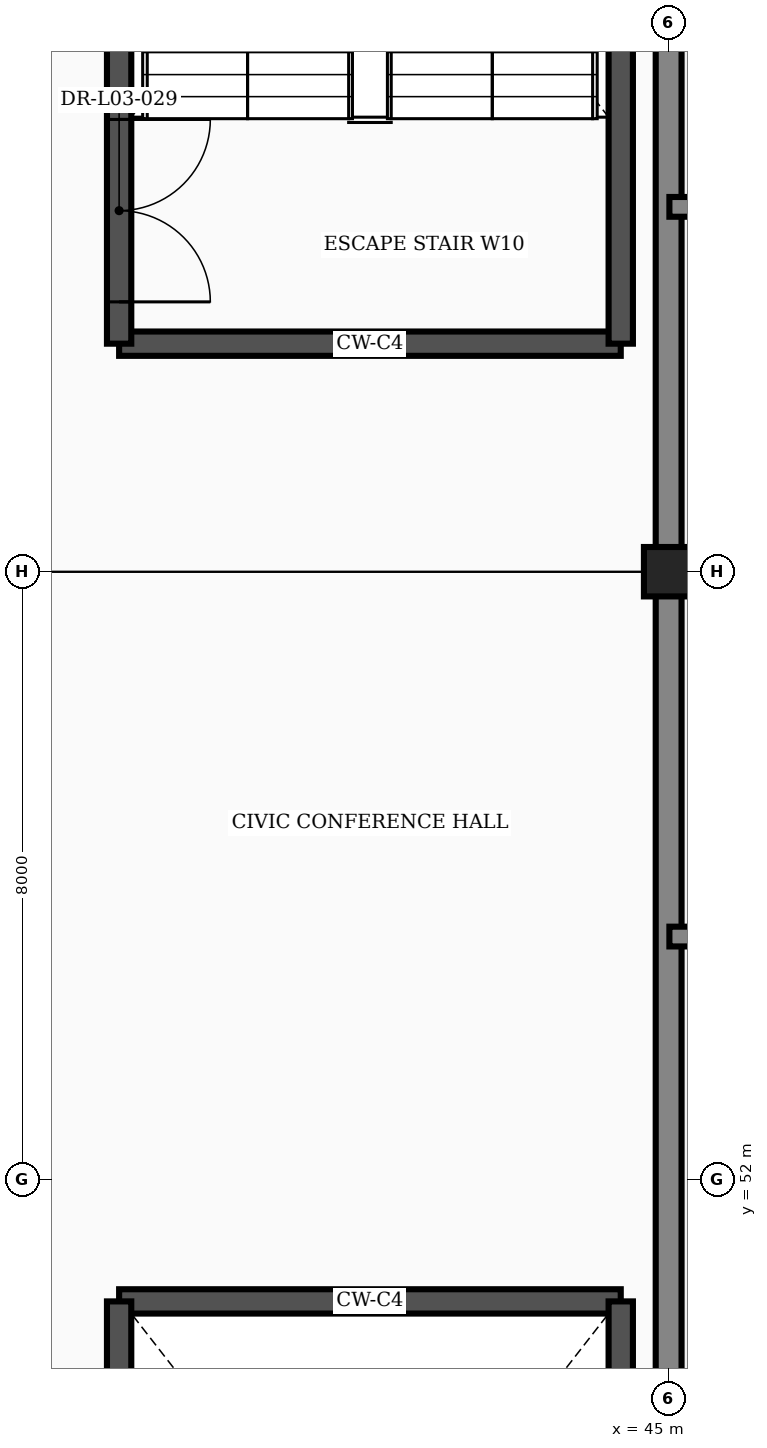
"""IFC4 building model, lengths in metres.
Left out: names, types, materials, properties, quantities, classifications, styles, units other than length and angle.
Written with IfcOpenShell. Run it as: python <this file> out.ifc"""

import sys

from ifc_helpers import new_model, si_unit, direction, frame, frame_2d, origin, origin_2d, place, context, subcontext, project, spatial, rectangle, extrude, element, fill, save


model = new_model("IFC4")
c1 = context("Model", 3, precision=1e-05, world=origin(), true_north=direction((0.0, 1.0)))
c2 = subcontext(c1, "Body", "Model", "MODEL_VIEW")
j1 = project(units=[si_unit("LENGTHUNIT", "METRE"), si_unit("PLANEANGLEUNIT", "RADIAN")], contexts=[c1])
p1 = place(None, origin())
s1 = spatial("IfcSite", under=j1, at=p1, CompositionType="ELEMENT")
p2 = place(p1, origin())
s2 = spatial("IfcBuilding", under=s1, at=p2, CompositionType="ELEMENT")
p3 = place(p2, frame((0.0, 0.0, 16.8)))
s3 = spatial("IfcBuildingStorey", under=s2, at=p3, CompositionType="ELEMENT", Elevation=16.8)
p4 = place(p3, frame((45.0, 60.0, 0.0), z_axis=(0.0, 0.0, 1.0), x_axis=(1.0, 0.0, 0.0)))
e1 = element("IfcColumn", 1, at=p4, inside=s3, PredefinedType="COLUMN", context=c2, shape_type="SweptSolid", body=[
    extrude(rectangle(XDim=0.65, YDim=0.65, at=origin_2d()), origin(), (0.0, 0.0, 1.0), 4.8),
])
for number, where, z_axis, x_axis in (
    (2, (45.0, 36.198, 0.0), (0.0, 0.0, 1.0), (0.0, 1.0, 0.0)),
    (3, (45.0, 60.317, 0.0), (0.0, 0.0, 1.0), (0.0, 1.0, 0.0)),
):
    element("IfcWall", number, at=place(p3, frame(where, z_axis=z_axis, x_axis=x_axis)), inside=s3, PredefinedType="STANDARD", context=c2, shape_type="SweptSolid", body=[
        extrude(rectangle(XDim=23.485, YDim=0.34, at=frame_2d((11.742, 0.0))), origin(), (0.0, 0.0, 1.0), 3.423),
    ])
p5 = place(p3, frame((45.01, 55.2, 4.005), z_axis=(0.0, 0.0, 1.0), x_axis=(1.0, 0.0, 0.0)))
e4 = element("IfcWall", 4, at=p5, inside=s3, PredefinedType="STANDARD", context=c2, shape_type="SweptSolid", body=[
    extrude(rectangle(XDim=17.99, YDim=0.26, at=frame_2d((8.995, 0.0))), origin(), (0.0, 0.0, 1.0), 2.049),
])
p6 = place(p5, frame((7.595, 0.0, 0.32)))
e5 = element("IfcOpeningElement", 5, at=p6, cuts=e4, PredefinedType="OPENING", context=c2, shape_type="SweptSolid", body=[
    extrude(rectangle(XDim=2.8, YDim=1.35, at=frame_2d((1.4, 0.675))), frame((0.0, 0.142, 0.0), z_axis=(0.0, -1.0, 0.0), x_axis=(1.0, 0.0, 0.0)), (0.0, 0.0, 1.0), 0.284),
])
p7 = place(p3, frame((45.01, 64.8, 4.005), z_axis=(0.0, 0.0, 1.0), x_axis=(1.0, 0.0, 0.0)))
e6 = element("IfcWall", 6, at=p7, inside=s3, PredefinedType="STANDARD", context=c2, shape_type="SweptSolid", body=[
    extrude(rectangle(XDim=17.99, YDim=0.26, at=frame_2d((8.995, 0.0))), origin(), (0.0, 0.0, 1.0), 2.049),
])
p8 = place(p7, frame((7.395, 0.0, 0.32)))
e7 = element("IfcOpeningElement", 7, at=p8, cuts=e6, PredefinedType="OPENING", context=c2, shape_type="SweptSolid", body=[
    extrude(rectangle(XDim=3.2, YDim=1.35, at=frame_2d((1.6, 0.675))), frame((0.0, 0.142, 0.0), z_axis=(0.0, -1.0, 0.0), x_axis=(1.0, 0.0, 0.0)), (0.0, 0.0, 1.0), 0.284),
])
p9 = place(p3, frame((37.77, 50.4, 0.0), z_axis=(0.0, 0.0, 1.0), x_axis=(1.0, 0.0, 0.0)))
e8 = element("IfcWall", 8, at=p9, inside=s3, PredefinedType="SHEAR", context=c2, shape_type="SweptSolid", body=[
    extrude(rectangle(XDim=6.6, YDim=0.32, at=frame_2d((3.3, 0.0))), origin(), (0.0, 0.0, 1.0), 4.555),
])
p10 = place(p3, frame((37.77, 39.2, 0.0), z_axis=(0.0, 0.0, 1.0), x_axis=(0.0, 1.0, 0.0)))
e9 = element("IfcWall", 9, at=p10, inside=s3, PredefinedType="SHEAR", context=c2, shape_type="SweptSolid", body=[
    extrude(rectangle(XDim=11.2, YDim=0.32, at=frame_2d((5.6, 0.0))), origin(), (0.0, 0.0, 1.0), 4.555),
])
p11 = place(p10, frame((0.55, 0.0, 0.0)))
e10 = element("IfcOpeningElement", 10, at=p11, cuts=e9, PredefinedType="OPENING", context=c2, shape_type="SweptSolid", body=[
    extrude(rectangle(XDim=2.4, YDim=2.25, at=frame_2d((1.2, 1.125))), frame((0.0, 0.172, 0.0), z_axis=(0.0, -1.0, 0.0), x_axis=(1.0, 0.0, 0.0)), (0.0, 0.0, 1.0), 0.344),
])
p12 = place(p3, frame((44.37, 39.2, 0.0), z_axis=(0.0, 0.0, 1.0), x_axis=(0.0, 1.0, 0.0)))
e11 = element("IfcWall", 11, at=p12, inside=s3, PredefinedType="SHEAR", context=c2, shape_type="SweptSolid", body=[
    extrude(rectangle(XDim=11.2, YDim=0.32, at=frame_2d((5.6, 0.0))), origin(), (0.0, 0.0, 1.0), 4.555),
])
p13 = place(p3, frame((37.77, 63.0, 0.0), z_axis=(0.0, 0.0, 1.0), x_axis=(1.0, 0.0, 0.0)))
e12 = element("IfcWall", 12, at=p13, inside=s3, PredefinedType="SHEAR", context=c2, shape_type="SweptSolid", body=[
    extrude(rectangle(XDim=6.6, YDim=0.32, at=frame_2d((3.3, 0.0))), origin(), (0.0, 0.0, 1.0), 4.555),
])
p14 = place(p3, frame((37.77, 63.0, 0.0), z_axis=(0.0, 0.0, 1.0), x_axis=(0.0, 1.0, 0.0)))
e13 = element("IfcWall", 13, at=p14, inside=s3, PredefinedType="SHEAR", context=c2, shape_type="SweptSolid", body=[
    extrude(rectangle(XDim=11.2, YDim=0.32, at=frame_2d((5.6, 0.0))), origin(), (0.0, 0.0, 1.0), 4.555),
])
p15 = place(p14, frame((0.55, 0.0, 0.0)))
e14 = element("IfcOpeningElement", 14, at=p15, cuts=e13, PredefinedType="OPENING", context=c2, shape_type="SweptSolid", body=[
    extrude(rectangle(XDim=2.4, YDim=2.25, at=frame_2d((1.2, 1.125))), frame((0.0, 0.172, 0.0), z_axis=(0.0, -1.0, 0.0), x_axis=(1.0, 0.0, 0.0)), (0.0, 0.0, 1.0), 0.344),
])
p16 = place(p3, frame((44.37, 63.0, 0.0), z_axis=(0.0, 0.0, 1.0), x_axis=(0.0, 1.0, 0.0)))
e15 = element("IfcWall", 15, at=p16, inside=s3, PredefinedType="SHEAR", context=c2, shape_type="SweptSolid", body=[
    extrude(rectangle(XDim=11.2, YDim=0.32, at=frame_2d((5.6, 0.0))), origin(), (0.0, 0.0, 1.0), 4.555),
])
p17 = place(p15, frame((2.4, 0.0, 0.0), z_axis=(0.0, 0.0, 1.0), x_axis=(-1.0, 0.0, 0.0)))
e16 = element("IfcDoor", 16, at=p17, inside=s3, OperationType="DOUBLE_DOOR_SINGLE_SWING", PredefinedType="DOOR", context=c2, shape_type="SweptSolid", body=[
    extrude(rectangle(XDim=2.4, YDim=2.25, at=frame_2d((1.2, 1.125))), frame((0.0, 0.025, 0.0), z_axis=(0.0, -1.0, 0.0), x_axis=(1.0, 0.0, 0.0)), (0.0, 0.0, 1.0), 0.05),
])
fill(e14, e16)
save(model, sys.argv[1])
